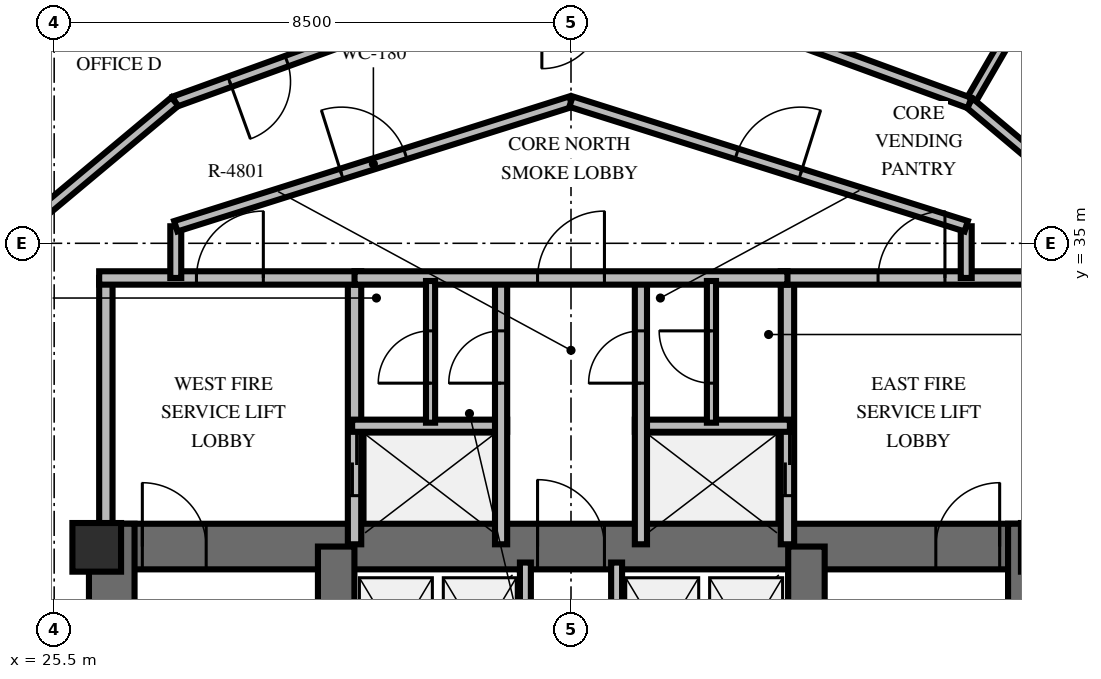
"""IFC4 building model, lengths in metres.
Left out: names, types, materials, properties, quantities, classifications, styles, units other than length and angle.
Written with IfcOpenShell. Run it as: python <this file> out.ifc"""

import sys

from ifc_helpers import new_model, si_unit, direction, frame, frame_2d, origin, origin_2d, place, context, subcontext, project, spatial, rectangle, extrude, element, fill, save


model = new_model("IFC4")
c1 = context("Model", 3, precision=1e-05, world=origin(), true_north=direction((0.0, 1.0)))
c2 = subcontext(c1, "Body", "Model", "MODEL_VIEW")
j1 = project(units=[si_unit("LENGTHUNIT", "METRE"), si_unit("PLANEANGLEUNIT", "RADIAN")], contexts=[c1])
p1 = place(None, origin())
s1 = spatial("IfcSite", under=j1, at=p1, CompositionType="ELEMENT")
p2 = place(p1, origin())
s2 = spatial("IfcBuilding", under=s1, at=p2, CompositionType="ELEMENT")
p3 = place(p2, frame((0.0, 0.0, 198.8)))
s3 = spatial("IfcBuildingStorey", under=s2, at=p3, CompositionType="ELEMENT", Elevation=198.8)
p4 = place(p3, frame((26.072, 30.013, 0.0), z_axis=(0.0, 0.0, 1.0), x_axis=(1.0, 0.0, 0.0)))
e1 = element("IfcWall", 1, at=p4, inside=s3, PredefinedType="SHEAR", context=c2, shape_type="SweptSolid", body=[
    extrude(rectangle(XDim=15.866, YDim=0.75, at=frame_2d((7.933, 0.0))), origin(), (0.0, 0.0, 1.0), 3.6),
])
p5 = place(p4, frame((0.878, 0.0, 0.0)))
e2 = element("IfcOpeningElement", 2, at=p5, cuts=e1, PredefinedType="OPENING", context=c2, shape_type="SweptSolid", body=[
    extrude(rectangle(XDim=1.05, YDim=2.15, at=frame_2d((0.525, 1.075))), frame((0.0, 0.385, 0.0), z_axis=(0.0, -1.0, 0.0), x_axis=(1.0, 0.0, 0.0)), (0.0, 0.0, 1.0), 0.77),
])
p6 = place(p4, frame((13.928, 0.0, 0.0)))
e3 = element("IfcOpeningElement", 3, at=p6, cuts=e1, PredefinedType="OPENING", context=c2, shape_type="SweptSolid", body=[
    extrude(rectangle(XDim=1.05, YDim=2.15, at=frame_2d((0.525, 1.075))), frame((0.0, 0.385, 0.0), z_axis=(0.0, -1.0, 0.0), x_axis=(1.0, 0.0, 0.0)), (0.0, 0.0, 1.0), 0.77),
])
p7 = place(p4, frame((7.378, 0.0, 0.0)))
e4 = element("IfcOpeningElement", 4, at=p7, cuts=e1, PredefinedType="OPENING", context=c2, shape_type="SweptSolid", body=[
    extrude(rectangle(XDim=1.1, YDim=2.15, at=frame_2d((0.55, 1.075))), frame((0.0, 0.385, 0.0), z_axis=(0.0, -1.0, 0.0), x_axis=(1.0, 0.0, 0.0)), (0.0, 0.0, 1.0), 0.77),
])
for number, where, z_axis, x_axis in (
    (5, (26.447, 19.812, 0.0), (0.0, 0.0, 1.0), (0.0, 1.0, 0.0)),
    (6, (41.563, 19.812, 0.0), (0.0, 0.0, 1.0), (0.0, 1.0, 0.0)),
):
    element("IfcWall", number, at=place(p3, frame(where, z_axis=z_axis, x_axis=x_axis)), inside=s3, PredefinedType="SHEAR", context=c2, shape_type="SweptSolid", body=[
        extrude(rectangle(XDim=10.576, YDim=0.75, at=frame_2d((5.288, 0.0))), origin(), (0.0, 0.0, 1.0), 3.6),
    ])
for number, where, z_axis, x_axis in (
    (7, (30.138, 20.187, 0.0), (0.0, 0.0, 1.0), (0.0, 1.0, 0.0)),
    (8, (37.872, 20.187, 0.0), (0.0, 0.0, 1.0), (0.0, 1.0, 0.0)),
):
    element("IfcWall", number, at=place(p3, frame(where, z_axis=z_axis, x_axis=x_axis)), inside=s3, PredefinedType="SHEAR", context=c2, shape_type="SweptSolid", body=[
        extrude(rectangle(XDim=9.826, YDim=0.6, at=frame_2d((4.913, 0.0))), origin(), (0.0, 0.0, 1.0), 3.6),
    ])
p8 = place(p3, frame((26.2, 30.0, 0.0), z_axis=(0.0, 0.0, 1.0), x_axis=(1.0, 0.0, 0.0)))
e9 = element("IfcColumn", 9, at=p8, inside=s3, PredefinedType="PILASTER", context=c2, shape_type="SweptSolid", body=[
    extrude(rectangle(XDim=0.8, YDim=0.8, at=origin_2d()), origin(), (0.0, 0.0, 1.0), 3.6),
])
p9 = place(p3, frame((25.81, 42.13, 0.0), z_axis=(0.0, 0.0, 1.0), x_axis=(-0.767168792304, -0.641445277569, 0.0)))
e10 = element("IfcWall", 10, at=p9, inside=s3, PredefinedType="SOLIDWALL", context=c2, shape_type="SweptSolid", body=[
    extrude(rectangle(XDim=8.127, YDim=0.3, at=frame_2d((4.063, 0.0))), origin(), (0.0, 0.0, 1.0), 2.66),
])
p10 = place(p9, frame((5.15, 0.0, 0.0)))
e11 = element("IfcOpeningElement", 11, at=p10, cuts=e10, PredefinedType="OPENING", context=c2, shape_type="SweptSolid", body=[
    extrude(rectangle(XDim=1.05, YDim=2.15, at=frame_2d((0.525, 1.075))), frame((0.0, 0.16, 0.0), z_axis=(0.0, -1.0, 0.0), x_axis=(1.0, 0.0, 0.0)), (0.0, 0.0, 1.0), 0.32),
])
p11 = place(p3, frame((26.35, 30.05, 0.0), z_axis=(0.0, 0.0, 1.0), x_axis=(0.0, 1.0, 0.0)))
e12 = element("IfcWall", 12, at=p11, inside=s3, PredefinedType="SOLIDWALL", context=c2, shape_type="SweptSolid", body=[
    extrude(rectangle(XDim=4.38, YDim=0.22, at=frame_2d((2.19, 0.0))), origin(), (0.0, 0.0, 1.0), 2.46),
])
p12 = place(p3, frame((30.44, 30.05, 0.0), z_axis=(0.0, 0.0, 1.0), x_axis=(0.0, 1.0, 0.0)))
e13 = element("IfcWall", 13, at=p12, inside=s3, PredefinedType="SOLIDWALL", context=c2, shape_type="SweptSolid", body=[
    extrude(rectangle(XDim=4.38, YDim=0.22, at=frame_2d((2.19, 0.0))), origin(), (0.0, 0.0, 1.0), 2.46),
])
p13 = place(p12, frame((0.8, 0.0, 0.0)))
e14 = element("IfcOpeningElement", 14, at=p13, cuts=e13, PredefinedType="OPENING", context=c2, shape_type="SweptSolid", body=[
    extrude(rectangle(XDim=1.05, YDim=2.1, at=frame_2d((0.525, 1.05))), frame((0.0, 0.12, 0.0), z_axis=(0.0, -1.0, 0.0), x_axis=(1.0, 0.0, 0.0)), (0.0, 0.0, 1.0), 0.24),
])
p14 = place(p3, frame((26.24, 34.43, 0.0), z_axis=(0.0, 0.0, 1.0), x_axis=(1.0, 0.0, 0.0)))
e15 = element("IfcWall", 15, at=p14, inside=s3, PredefinedType="SOLIDWALL", context=c2, shape_type="SweptSolid", body=[
    extrude(rectangle(XDim=4.31, YDim=0.22, at=frame_2d((2.155, 0.0))), origin(), (0.0, 0.0, 1.0), 2.46),
])
p15 = place(p14, frame((1.6, 0.0, 0.0)))
e16 = element("IfcOpeningElement", 16, at=p15, cuts=e15, PredefinedType="OPENING", context=c2, shape_type="SweptSolid", body=[
    extrude(rectangle(XDim=1.1, YDim=2.15, at=frame_2d((0.55, 1.075))), frame((0.0, 0.12, 0.0), z_axis=(0.0, -1.0, 0.0), x_axis=(1.0, 0.0, 0.0)), (0.0, 0.0, 1.0), 0.24),
])
p16 = place(p3, frame((30.4, 32.0, 0.0), z_axis=(0.0, 0.0, 1.0), x_axis=(1.0, 0.0, 0.0)))
e17 = element("IfcWall", 17, at=p16, inside=s3, PredefinedType="SOLIDWALL", context=c2, shape_type="SweptSolid", body=[
    extrude(rectangle(XDim=2.55, YDim=0.2, at=frame_2d((1.275, 0.0))), origin(), (0.0, 0.0, 1.0), 2.46),
])
p17 = place(p3, frame((32.85, 30.05, 0.0), z_axis=(0.0, 0.0, 1.0), x_axis=(0.0, 1.0, 0.0)))
e18 = element("IfcWall", 18, at=p17, inside=s3, PredefinedType="SOLIDWALL", context=c2, shape_type="SweptSolid", body=[
    extrude(rectangle(XDim=4.38, YDim=0.2, at=frame_2d((2.19, 0.0))), origin(), (0.0, 0.0, 1.0), 2.46),
])
p18 = place(p17, frame((2.65, 0.0, 0.0)))
e19 = element("IfcOpeningElement", 19, at=p18, cuts=e18, PredefinedType="OPENING", context=c2, shape_type="SweptSolid", body=[
    extrude(rectangle(XDim=0.86, YDim=2.05, at=frame_2d((0.43, 1.025))), frame((0.0, 0.11, 0.0), z_axis=(0.0, -1.0, 0.0), x_axis=(1.0, 0.0, 0.0)), (0.0, 0.0, 1.0), 0.22),
])
p19 = place(p3, frame((37.56, 30.05, 0.0), z_axis=(0.0, 0.0, 1.0), x_axis=(0.0, 1.0, 0.0)))
e20 = element("IfcWall", 20, at=p19, inside=s3, PredefinedType="SOLIDWALL", context=c2, shape_type="SweptSolid", body=[
    extrude(rectangle(XDim=4.38, YDim=0.22, at=frame_2d((2.19, 0.0))), origin(), (0.0, 0.0, 1.0), 2.46),
])
p20 = place(p19, frame((0.8, 0.0, 0.0)))
e21 = element("IfcOpeningElement", 21, at=p20, cuts=e20, PredefinedType="OPENING", context=c2, shape_type="SweptSolid", body=[
    extrude(rectangle(XDim=1.05, YDim=2.1, at=frame_2d((0.525, 1.05))), frame((0.0, 0.12, 0.0), z_axis=(0.0, -1.0, 0.0), x_axis=(1.0, 0.0, 0.0)), (0.0, 0.0, 1.0), 0.24),
])
p21 = place(p3, frame((37.45, 34.43, 0.0), z_axis=(0.0, 0.0, 1.0), x_axis=(1.0, 0.0, 0.0)))
e22 = element("IfcWall", 22, at=p21, inside=s3, PredefinedType="SOLIDWALL", context=c2, shape_type="SweptSolid", body=[
    extrude(rectangle(XDim=4.31, YDim=0.22, at=frame_2d((2.155, 0.0))), origin(), (0.0, 0.0, 1.0), 2.46),
])
p22 = place(p21, frame((1.6, 0.0, 0.0)))
e23 = element("IfcOpeningElement", 23, at=p22, cuts=e22, PredefinedType="OPENING", context=c2, shape_type="SweptSolid", body=[
    extrude(rectangle(XDim=1.1, YDim=2.15, at=frame_2d((0.55, 1.075))), frame((0.0, 0.12, 0.0), z_axis=(0.0, -1.0, 0.0), x_axis=(1.0, 0.0, 0.0)), (0.0, 0.0, 1.0), 0.24),
])
p23 = place(p3, frame((35.05, 32.0, 0.0), z_axis=(0.0, 0.0, 1.0), x_axis=(1.0, 0.0, 0.0)))
e24 = element("IfcWall", 24, at=p23, inside=s3, PredefinedType="SOLIDWALL", context=c2, shape_type="SweptSolid", body=[
    extrude(rectangle(XDim=2.55, YDim=0.2, at=frame_2d((1.275, 0.0))), origin(), (0.0, 0.0, 1.0), 2.46),
])
p24 = place(p3, frame((35.15, 30.05, 0.0), z_axis=(0.0, 0.0, 1.0), x_axis=(0.0, 1.0, 0.0)))
e25 = element("IfcWall", 25, at=p24, inside=s3, PredefinedType="SOLIDWALL", context=c2, shape_type="SweptSolid", body=[
    extrude(rectangle(XDim=4.38, YDim=0.2, at=frame_2d((2.19, 0.0))), origin(), (0.0, 0.0, 1.0), 2.46),
])
p25 = place(p24, frame((2.65, 0.0, 0.0)))
e26 = element("IfcOpeningElement", 26, at=p25, cuts=e25, PredefinedType="OPENING", context=c2, shape_type="SweptSolid", body=[
    extrude(rectangle(XDim=0.86, YDim=2.05, at=frame_2d((0.43, 1.025))), frame((0.0, 0.11, 0.0), z_axis=(0.0, -1.0, 0.0), x_axis=(1.0, 0.0, 0.0)), (0.0, 0.0, 1.0), 0.22),
])
p26 = place(p3, frame((30.44, 34.43, 0.0), z_axis=(0.0, 0.0, 1.0), x_axis=(1.0, 0.0, 0.0)))
e27 = element("IfcWall", 27, at=p26, inside=s3, PredefinedType="SOLIDWALL", context=c2, shape_type="SweptSolid", body=[
    extrude(rectangle(XDim=7.12, YDim=0.22, at=frame_2d((3.56, 0.0))), origin(), (0.0, 0.0, 1.0), 2.46),
])
p27 = place(p26, frame((3.01, 0.0, 0.0)))
e28 = element("IfcOpeningElement", 28, at=p27, cuts=e27, PredefinedType="OPENING", context=c2, shape_type="SweptSolid", body=[
    extrude(rectangle(XDim=1.1, YDim=2.15, at=frame_2d((0.55, 1.075))), frame((0.0, 0.12, 0.0), z_axis=(0.0, -1.0, 0.0), x_axis=(1.0, 0.0, 0.0)), (0.0, 0.0, 1.0), 0.24),
])
p28 = place(p3, frame((31.69, 32.05, 0.0), z_axis=(0.0, 0.0, 1.0), x_axis=(0.0, 1.0, 0.0)))
e29 = element("IfcWall", 29, at=p28, inside=s3, PredefinedType="PARTITIONING", context=c2, shape_type="SweptSolid", body=[
    extrude(rectangle(XDim=2.33, YDim=0.15, at=frame_2d((1.165, 0.0))), origin(), (0.0, 0.0, 1.0), 2.46),
])
p29 = place(p28, frame((0.65, 0.0, 0.0)))
e30 = element("IfcOpeningElement", 30, at=p29, cuts=e29, PredefinedType="OPENING", context=c2, shape_type="SweptSolid", body=[
    extrude(rectangle(XDim=0.86, YDim=2.05, at=frame_2d((0.43, 1.025))), frame((0.0, 0.085, 0.0), z_axis=(0.0, -1.0, 0.0), x_axis=(1.0, 0.0, 0.0)), (0.0, 0.0, 1.0), 0.17),
])
p30 = place(p3, frame((36.31, 32.05, 0.0), z_axis=(0.0, 0.0, 1.0), x_axis=(0.0, 1.0, 0.0)))
e31 = element("IfcWall", 31, at=p30, inside=s3, PredefinedType="PARTITIONING", context=c2, shape_type="SweptSolid", body=[
    extrude(rectangle(XDim=2.33, YDim=0.15, at=frame_2d((1.165, 0.0))), origin(), (0.0, 0.0, 1.0), 2.46),
])
p31 = place(p30, frame((0.65, 0.0, 0.0)))
e32 = element("IfcOpeningElement", 32, at=p31, cuts=e31, PredefinedType="OPENING", context=c2, shape_type="SweptSolid", body=[
    extrude(rectangle(XDim=0.86, YDim=2.05, at=frame_2d((0.43, 1.025))), frame((0.0, 0.085, 0.0), z_axis=(0.0, -1.0, 0.0), x_axis=(1.0, 0.0, 0.0)), (0.0, 0.0, 1.0), 0.17),
])
for number, where, z_axis, x_axis in (
    (33, (33.25, 27.28, 0.0), (0.0, 0.0, 1.0), (0.0, 1.0, 0.0)),
    (34, (34.75, 27.28, 0.0), (0.0, 0.0, 1.0), (0.0, 1.0, 0.0)),
):
    element("IfcWall", number, at=place(p3, frame(where, z_axis=z_axis, x_axis=x_axis)), inside=s3, PredefinedType="SOLIDWALL", context=c2, shape_type="SweptSolid", body=[
        extrude(rectangle(XDim=2.47, YDim=0.18, at=frame_2d((1.235, 0.0))), origin(), (0.0, 0.0, 1.0), 2.46),
    ])
for number, where, z_axis, x_axis in (
    (35, (27.5, 34.43, 0.0), (0.0, 0.0, 1.0), (0.0, 1.0, 0.0)),
    (36, (40.5, 35.28, 0.0), (0.0, 0.0, 1.0), (0.0, -1.0, 0.0)),
):
    element("IfcWall", number, at=place(p3, frame(where, z_axis=z_axis, x_axis=x_axis)), inside=s3, PredefinedType="PARTITIONING", context=c2, shape_type="SweptSolid", body=[
        extrude(rectangle(XDim=0.85, YDim=0.18, at=frame_2d((0.425, 0.0))), origin(), (0.0, 0.0, 1.0), 2.46),
    ])
p32 = place(p3, frame((27.5, 35.28, 0.0), z_axis=(0.0, 0.0, 1.0), x_axis=(0.953691418528, 0.300786765376, 0.0)))
e37 = element("IfcWall", 37, at=p32, inside=s3, PredefinedType="PARTITIONING", context=c2, shape_type="SweptSolid", body=[
    extrude(rectangle(XDim=6.816, YDim=0.18, at=frame_2d((3.408, 0.0))), origin(), (0.0, 0.0, 1.0), 2.46),
])
p33 = place(p32, frame((2.858, 0.0, 0.0)))
e38 = element("IfcOpeningElement", 38, at=p33, cuts=e37, PredefinedType="OPENING", context=c2, shape_type="SweptSolid", body=[
    extrude(rectangle(XDim=1.1, YDim=2.15, at=frame_2d((0.55, 1.075))), frame((0.0, 0.1, 0.0), z_axis=(0.0, -1.0, 0.0), x_axis=(1.0, 0.0, 0.0)), (0.0, 0.0, 1.0), 0.2),
])
p34 = place(p3, frame((34.0, 37.33, 0.0), z_axis=(0.0, 0.0, 1.0), x_axis=(0.953691418528, -0.300786765376, 0.0)))
e39 = element("IfcWall", 39, at=p34, inside=s3, PredefinedType="PARTITIONING", context=c2, shape_type="SweptSolid", body=[
    extrude(rectangle(XDim=6.816, YDim=0.18, at=frame_2d((3.408, 0.0))), origin(), (0.0, 0.0, 1.0), 2.46),
])
p35 = place(p34, frame((2.858, 0.0, 0.0)))
e40 = element("IfcOpeningElement", 40, at=p35, cuts=e39, PredefinedType="OPENING", context=c2, shape_type="SweptSolid", body=[
    extrude(rectangle(XDim=1.1, YDim=2.15, at=frame_2d((0.55, 1.075))), frame((0.0, 0.1, 0.0), z_axis=(0.0, -1.0, 0.0), x_axis=(1.0, 0.0, 0.0)), (0.0, 0.0, 1.0), 0.2),
])
p36 = place(p3, frame((40.555, 37.308, 0.0), z_axis=(0.0, 0.0, 1.0), x_axis=(0.501515529592, 0.865148642476, 0.0)))
e41 = element("IfcWall", 41, at=p36, inside=s3, PredefinedType="PARTITIONING", context=c2, shape_type="SweptSolid", body=[
    extrude(rectangle(XDim=9.416, YDim=0.16, at=frame_2d((4.708, 0.0))), origin(), (0.0, 0.0, 1.0), 2.46),
])
p37 = place(p3, frame((44.027, 34.384, 0.0), z_axis=(0.0, 0.0, 1.0), x_axis=(-0.764922355877, 0.64412249571, 0.0)))
e42 = element("IfcWall", 42, at=p37, inside=s3, PredefinedType="PARTITIONING", context=c2, shape_type="SweptSolid", body=[
    extrude(rectangle(XDim=4.539, YDim=0.18, at=frame_2d((2.27, 0.0))), origin(), (0.0, 0.0, 1.0), 2.46),
])
p38 = place(p37, frame((0.96, 0.0, 0.0)))
e43 = element("IfcOpeningElement", 43, at=p38, cuts=e42, PredefinedType="OPENING", context=c2, shape_type="SweptSolid", body=[
    extrude(rectangle(XDim=1.0, YDim=2.15, at=frame_2d((0.5, 1.075))), frame((0.0, 0.1, 0.0), z_axis=(0.0, -1.0, 0.0), x_axis=(1.0, 0.0, 0.0)), (0.0, 0.0, 1.0), 0.2),
])
p39 = place(p3, frame((40.555, 37.308, 0.0), z_axis=(0.0, 0.0, 1.0), x_axis=(-0.93910210925, 0.343638223139, 0.0)))
e44 = element("IfcWall", 44, at=p39, inside=s3, PredefinedType="PARTITIONING", context=c2, shape_type="SweptSolid", body=[
    extrude(rectangle(XDim=4.539, YDim=0.18, at=frame_2d((2.27, 0.0))), origin(), (0.0, 0.0, 1.0), 2.46),
])
p40 = place(p3, frame((31.753, 38.875, 0.0), z_axis=(0.0, 0.0, 1.0), x_axis=(-0.940277723182, -0.340408289099, 0.0)))
e45 = element("IfcWall", 45, at=p40, inside=s3, PredefinedType="PARTITIONING", context=c2, shape_type="SweptSolid", body=[
    extrude(rectangle(XDim=4.539, YDim=0.18, at=frame_2d((2.27, 0.0))), origin(), (0.0, 0.0, 1.0), 2.46),
])
p41 = place(p40, frame((2.579, 0.0, 0.0)))
e46 = element("IfcOpeningElement", 46, at=p41, cuts=e45, PredefinedType="OPENING", context=c2, shape_type="SweptSolid", body=[
    extrude(rectangle(XDim=1.0, YDim=2.15, at=frame_2d((0.5, 1.075))), frame((0.0, 0.1, 0.0), z_axis=(0.0, -1.0, 0.0), x_axis=(1.0, 0.0, 0.0)), (0.0, 0.0, 1.0), 0.2),
])
p42 = place(p3, frame((27.485, 37.33, 0.0), z_axis=(0.0, 0.0, 1.0), x_axis=(-0.767179846664, -0.641432056318, 0.0)))
e47 = element("IfcWall", 47, at=p42, inside=s3, PredefinedType="PARTITIONING", context=c2, shape_type="SweptSolid", body=[
    extrude(rectangle(XDim=4.539, YDim=0.18, at=frame_2d((2.27, 0.0))), origin(), (0.0, 0.0, 1.0), 2.46),
])
p43 = place(p3, frame((26.263, 39.454, 0.0), z_axis=(0.0, 0.0, 1.0), x_axis=(-0.76717696823, -0.641435499032, 0.0)))
e48 = element("IfcWall", 48, at=p43, inside=s3, PredefinedType="PARTITIONING", context=c2, shape_type="SweptSolid", body=[
    extrude(rectangle(XDim=5.39, YDim=0.16, at=frame_2d((2.695, 0.0))), origin(), (0.0, 0.0, 1.0), 2.46),
])
p44 = place(p5, origin())
e49 = element("IfcDoor", 49, at=p44, inside=s3, OperationType="SINGLE_SWING_LEFT", PredefinedType="DOOR", context=c2, shape_type="SweptSolid", body=[
    extrude(rectangle(XDim=1.05, YDim=2.15, at=frame_2d((0.525, 1.075))), frame((0.0, 0.025, 0.0), z_axis=(0.0, -1.0, 0.0), x_axis=(1.0, 0.0, 0.0)), (0.0, 0.0, 1.0), 0.05),
])
fill(e2, e49)
p45 = place(p6, origin())
e50 = element("IfcDoor", 50, at=p45, inside=s3, OperationType="SINGLE_SWING_RIGHT", PredefinedType="DOOR", context=c2, shape_type="SweptSolid", body=[
    extrude(rectangle(XDim=1.05, YDim=2.15, at=frame_2d((0.525, 1.075))), frame((0.0, 0.025, 0.0), z_axis=(0.0, -1.0, 0.0), x_axis=(1.0, 0.0, 0.0)), (0.0, 0.0, 1.0), 0.05),
])
fill(e3, e50)
p46 = place(p7, origin())
e51 = element("IfcDoor", 51, at=p46, inside=s3, OperationType="SINGLE_SWING_LEFT", PredefinedType="DOOR", context=c2, shape_type="SweptSolid", body=[
    extrude(rectangle(XDim=1.1, YDim=2.15, at=frame_2d((0.55, 1.075))), frame((0.0, 0.025, 0.0), z_axis=(0.0, -1.0, 0.0), x_axis=(1.0, 0.0, 0.0)), (0.0, 0.0, 1.0), 0.05),
])
fill(e4, e51)
p47 = place(p15, origin())
e52 = element("IfcDoor", 52, at=p47, inside=s3, OperationType="SINGLE_SWING_RIGHT", PredefinedType="DOOR", context=c2, shape_type="SweptSolid", body=[
    extrude(rectangle(XDim=1.1, YDim=2.15, at=frame_2d((0.55, 1.075))), frame((0.0, 0.025, 0.0), z_axis=(0.0, -1.0, 0.0), x_axis=(1.0, 0.0, 0.0)), (0.0, 0.0, 1.0), 0.05),
])
fill(e16, e52)
p48 = place(p13, origin())
e53 = element("IfcDoor", 53, at=p48, inside=s3, OperationType="DOUBLE_DOOR_SLIDING", PredefinedType="USERDEFINED", context=c2, shape_type="SweptSolid", body=[
    extrude(rectangle(XDim=1.05, YDim=2.1, at=frame_2d((0.525, 1.05))), frame((0.0, 0.025, 0.0), z_axis=(0.0, -1.0, 0.0), x_axis=(1.0, 0.0, 0.0)), (0.0, 0.0, 1.0), 0.05),
])
fill(e14, e53)
p49 = place(p18, origin())
e54 = element("IfcDoor", 54, at=p49, inside=s3, OperationType="SINGLE_SWING_LEFT", PredefinedType="TRAPDOOR", context=c2, shape_type="SweptSolid", body=[
    extrude(rectangle(XDim=0.86, YDim=2.05, at=frame_2d((0.43, 1.025))), frame((0.0, 0.025, 0.0), z_axis=(0.0, -1.0, 0.0), x_axis=(1.0, 0.0, 0.0)), (0.0, 0.0, 1.0), 0.05),
])
fill(e19, e54)
p50 = place(p22, origin())
e55 = element("IfcDoor", 55, at=p50, inside=s3, OperationType="SINGLE_SWING_RIGHT", PredefinedType="DOOR", context=c2, shape_type="SweptSolid", body=[
    extrude(rectangle(XDim=1.1, YDim=2.15, at=frame_2d((0.55, 1.075))), frame((0.0, 0.025, 0.0), z_axis=(0.0, -1.0, 0.0), x_axis=(1.0, 0.0, 0.0)), (0.0, 0.0, 1.0), 0.05),
])
fill(e23, e55)
p51 = place(p20, origin())
e56 = element("IfcDoor", 56, at=p51, inside=s3, OperationType="DOUBLE_DOOR_SLIDING", PredefinedType="USERDEFINED", context=c2, shape_type="SweptSolid", body=[
    extrude(rectangle(XDim=1.05, YDim=2.1, at=frame_2d((0.525, 1.05))), frame((0.0, 0.025, 0.0), z_axis=(0.0, -1.0, 0.0), x_axis=(1.0, 0.0, 0.0)), (0.0, 0.0, 1.0), 0.05),
])
fill(e21, e56)
p52 = place(p25, origin())
e57 = element("IfcDoor", 57, at=p52, inside=s3, OperationType="SINGLE_SWING_LEFT", PredefinedType="TRAPDOOR", context=c2, shape_type="SweptSolid", body=[
    extrude(rectangle(XDim=0.86, YDim=2.05, at=frame_2d((0.43, 1.025))), frame((0.0, 0.025, 0.0), z_axis=(0.0, -1.0, 0.0), x_axis=(1.0, 0.0, 0.0)), (0.0, 0.0, 1.0), 0.05),
])
fill(e26, e57)
p53 = place(p27, origin())
e58 = element("IfcDoor", 58, at=p53, inside=s3, OperationType="SINGLE_SWING_RIGHT", PredefinedType="DOOR", context=c2, shape_type="SweptSolid", body=[
    extrude(rectangle(XDim=1.1, YDim=2.15, at=frame_2d((0.55, 1.075))), frame((0.0, 0.025, 0.0), z_axis=(0.0, -1.0, 0.0), x_axis=(1.0, 0.0, 0.0)), (0.0, 0.0, 1.0), 0.05),
])
fill(e28, e58)
p54 = place(p29, origin())
e59 = element("IfcDoor", 59, at=p54, inside=s3, OperationType="SINGLE_SWING_LEFT", PredefinedType="TRAPDOOR", context=c2, shape_type="SweptSolid", body=[
    extrude(rectangle(XDim=0.86, YDim=2.05, at=frame_2d((0.43, 1.025))), frame((0.0, 0.025, 0.0), z_axis=(0.0, -1.0, 0.0), x_axis=(1.0, 0.0, 0.0)), (0.0, 0.0, 1.0), 0.05),
])
fill(e30, e59)
p55 = place(p31, origin())
e60 = element("IfcDoor", 60, at=p55, inside=s3, OperationType="SINGLE_SWING_RIGHT", PredefinedType="TRAPDOOR", context=c2, shape_type="SweptSolid", body=[
    extrude(rectangle(XDim=0.86, YDim=2.05, at=frame_2d((0.43, 1.025))), frame((0.0, 0.025, 0.0), z_axis=(0.0, -1.0, 0.0), x_axis=(1.0, 0.0, 0.0)), (0.0, 0.0, 1.0), 0.05),
])
fill(e32, e60)
p56 = place(p33, origin())
e61 = element("IfcDoor", 61, at=p56, inside=s3, OperationType="SINGLE_SWING_LEFT", PredefinedType="DOOR", context=c2, shape_type="SweptSolid", body=[
    extrude(rectangle(XDim=1.1, YDim=2.15, at=frame_2d((0.55, 1.075))), frame((0.0, 0.025, 0.0), z_axis=(0.0, -1.0, 0.0), x_axis=(1.0, 0.0, 0.0)), (0.0, 0.0, 1.0), 0.05),
])
fill(e38, e61)
p57 = place(p35, origin())
e62 = element("IfcDoor", 62, at=p57, inside=s3, OperationType="SINGLE_SWING_RIGHT", PredefinedType="DOOR", context=c2, shape_type="SweptSolid", body=[
    extrude(rectangle(XDim=1.1, YDim=2.15, at=frame_2d((0.55, 1.075))), frame((0.0, 0.025, 0.0), z_axis=(0.0, -1.0, 0.0), x_axis=(1.0, 0.0, 0.0)), (0.0, 0.0, 1.0), 0.05),
])
fill(e40, e62)
p58 = place(p41, origin())
e63 = element("IfcDoor", 63, at=p58, inside=s3, OperationType="SINGLE_SWING_RIGHT", PredefinedType="DOOR", context=c2, shape_type="SweptSolid", body=[
    extrude(rectangle(XDim=1.0, YDim=2.15, at=frame_2d((0.5, 1.075))), frame((0.0, 0.025, 0.0), z_axis=(0.0, -1.0, 0.0), x_axis=(1.0, 0.0, 0.0)), (0.0, 0.0, 1.0), 0.05),
])
fill(e46, e63)
save(model, sys.argv[1])
